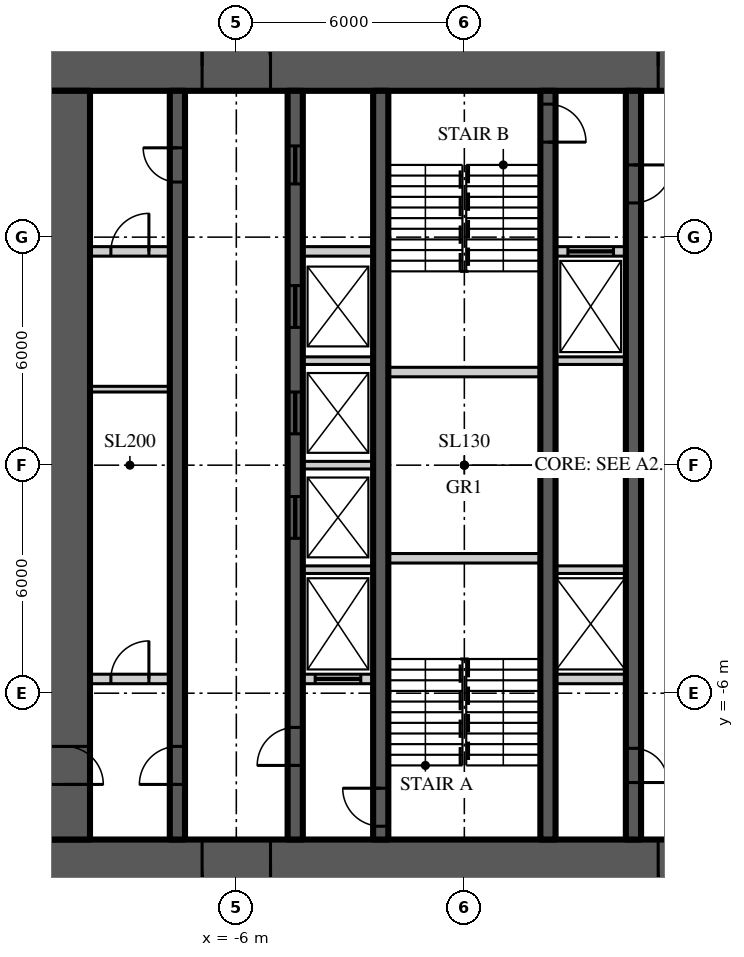
"""IFC4 building model, lengths in metres.
Left out: names, types, materials, properties, quantities, classifications, styles, units other than length and angle.
Written with IfcOpenShell. Run it as: python <this file> out.ifc"""

import sys

from ifc_helpers import new_model, si_unit, direction, frame, frame_2d, origin, place, context, subcontext, project, spatial, rectangle, extrude, element, fill, save


model = new_model("IFC4")
c1 = context("Model", 3, precision=1e-05, world=origin(), true_north=direction((0.0, 1.0)))
c2 = subcontext(c1, "Body", "Model", "MODEL_VIEW")
j1 = project(units=[si_unit("LENGTHUNIT", "METRE"), si_unit("PLANEANGLEUNIT", "RADIAN")], contexts=[c1])
p1 = place(None, origin())
s1 = spatial("IfcSite", under=j1, at=p1, CompositionType="ELEMENT")
p2 = place(p1, origin())
s2 = spatial("IfcBuilding", under=s1, at=p2, CompositionType="ELEMENT")
p3 = place(p2, frame((0.0, 0.0, 163.2)))
s3 = spatial("IfcBuildingStorey", under=s2, at=p3, CompositionType="ELEMENT", Elevation=163.2)
p4 = place(p3, frame((-11.15, 10.5, 0.0), z_axis=(0.0, 0.0, 1.0), x_axis=(1.0, 0.0, 0.0)))
e1 = element("IfcWall", 1, at=p4, inside=s3, PredefinedType="SHEAR", context=c2, shape_type="SweptSolid", body=[
    extrude(rectangle(XDim=22.3, YDim=1.3, at=frame_2d((11.15, 0.0))), origin(), (0.0, 0.0, 1.0), 3.9),
])
p5 = place(p4, frame((4.25, 0.0, 0.0)))
e2 = element("IfcOpeningElement", 2, at=p5, cuts=e1, PredefinedType="OPENING", context=c2, shape_type="SweptSolid", body=[
    extrude(rectangle(XDim=1.8, YDim=2.2, at=frame_2d((0.9, 1.1))), frame((0.0, 0.66, 0.0), z_axis=(0.0, -1.0, 0.0), x_axis=(1.0, 0.0, 0.0)), (0.0, 0.0, 1.0), 1.32),
])
p6 = place(p4, frame((16.25, 0.0, 0.0)))
e3 = element("IfcOpeningElement", 3, at=p6, cuts=e1, PredefinedType="OPENING", context=c2, shape_type="SweptSolid", body=[
    extrude(rectangle(XDim=1.8, YDim=2.2, at=frame_2d((0.9, 1.1))), frame((0.0, 0.66, 0.0), z_axis=(0.0, -1.0, 0.0), x_axis=(1.0, 0.0, 0.0)), (0.0, 0.0, 1.0), 1.32),
])
p7 = place(p3, frame((11.15, -10.5, 0.0), z_axis=(0.0, 0.0, 1.0), x_axis=(-1.0, 0.0, 0.0)))
e4 = element("IfcWall", 4, at=p7, inside=s3, PredefinedType="SHEAR", context=c2, shape_type="SweptSolid", body=[
    extrude(rectangle(XDim=22.3, YDim=1.3, at=frame_2d((11.15, 0.0))), origin(), (0.0, 0.0, 1.0), 3.9),
])
p8 = place(p7, frame((16.25, 0.0, 0.0)))
e5 = element("IfcOpeningElement", 5, at=p8, cuts=e4, PredefinedType="OPENING", context=c2, shape_type="SweptSolid", body=[
    extrude(rectangle(XDim=1.8, YDim=2.2, at=frame_2d((0.9, 1.1))), frame((0.0, 0.66, 0.0), z_axis=(0.0, -1.0, 0.0), x_axis=(1.0, 0.0, 0.0)), (0.0, 0.0, 1.0), 1.32),
])
p9 = place(p7, frame((4.25, 0.0, 0.0)))
e6 = element("IfcOpeningElement", 6, at=p9, cuts=e4, PredefinedType="OPENING", context=c2, shape_type="SweptSolid", body=[
    extrude(rectangle(XDim=1.8, YDim=2.2, at=frame_2d((0.9, 1.1))), frame((0.0, 0.66, 0.0), z_axis=(0.0, -1.0, 0.0), x_axis=(1.0, 0.0, 0.0)), (0.0, 0.0, 1.0), 1.32),
])
p10 = place(p3, frame((-10.5, 9.85, 0.0), z_axis=(0.0, 0.0, 1.0), x_axis=(0.0, -1.0, 0.0)))
e7 = element("IfcWall", 7, at=p10, inside=s3, PredefinedType="SHEAR", context=c2, shape_type="SweptSolid", body=[
    extrude(rectangle(XDim=19.7, YDim=1.3, at=frame_2d((9.85, 0.0))), origin(), (0.0, 0.0, 1.0), 3.9),
])
p11 = place(p10, frame((17.25, 0.0, 0.0)))
e8 = element("IfcOpeningElement", 8, at=p11, cuts=e7, PredefinedType="OPENING", context=c2, shape_type="SweptSolid", body=[
    extrude(rectangle(XDim=1.0, YDim=2.2, at=frame_2d((0.5, 1.1))), frame((0.0, 0.66, 0.0), z_axis=(0.0, -1.0, 0.0), x_axis=(1.0, 0.0, 0.0)), (0.0, 0.0, 1.0), 1.32),
])
p12 = place(p3, frame((-7.55, -9.85, 0.0), z_axis=(0.0, 0.0, 1.0), x_axis=(0.0, 1.0, 0.0)))
e9 = element("IfcWall", 9, at=p12, inside=s3, PredefinedType="SHEAR", context=c2, shape_type="SweptSolid", body=[
    extrude(rectangle(XDim=19.7, YDim=0.4, at=frame_2d((9.85, 0.0))), origin(), (0.0, 0.0, 1.0), 3.9),
])
p13 = place(p12, frame((1.45, 0.0, 0.0)))
e10 = element("IfcOpeningElement", 10, at=p13, cuts=e9, PredefinedType="OPENING", context=c2, shape_type="SweptSolid", body=[
    extrude(rectangle(XDim=1.0, YDim=2.2, at=frame_2d((0.5, 1.1))), frame((0.0, 0.21, 0.0), z_axis=(0.0, -1.0, 0.0), x_axis=(1.0, 0.0, 0.0)), (0.0, 0.0, 1.0), 0.42),
])
p14 = place(p12, frame((17.3, 0.0, 0.0)))
e11 = element("IfcOpeningElement", 11, at=p14, cuts=e9, PredefinedType="OPENING", context=c2, shape_type="SweptSolid", body=[
    extrude(rectangle(XDim=0.9, YDim=2.1, at=frame_2d((0.45, 1.05))), frame((0.0, 0.21, 0.0), z_axis=(0.0, -1.0, 0.0), x_axis=(1.0, 0.0, 0.0)), (0.0, 0.0, 1.0), 0.42),
])
p15 = place(p3, frame((-4.45, -9.85, 0.0), z_axis=(0.0, 0.0, 1.0), x_axis=(0.0, 1.0, 0.0)))
e12 = element("IfcWall", 12, at=p15, inside=s3, PredefinedType="SHEAR", context=c2, shape_type="SweptSolid", body=[
    extrude(rectangle(XDim=19.7, YDim=0.4, at=frame_2d((9.85, 0.0))), origin(), (0.0, 0.0, 1.0), 3.9),
])
p16 = place(p15, frame((1.95, 0.0, 0.0)))
e13 = element("IfcOpeningElement", 13, at=p16, cuts=e12, PredefinedType="OPENING", context=c2, shape_type="SweptSolid", body=[
    extrude(rectangle(XDim=1.0, YDim=2.2, at=frame_2d((0.5, 1.1))), frame((0.0, 0.21, 0.0), z_axis=(0.0, -1.0, 0.0), x_axis=(1.0, 0.0, 0.0)), (0.0, 0.0, 1.0), 0.42),
])
p17 = place(p15, frame((17.25, 0.0, 0.0)))
e14 = element("IfcOpeningElement", 14, at=p17, cuts=e12, PredefinedType="OPENING", context=c2, shape_type="SweptSolid", body=[
    extrude(rectangle(XDim=1.0, YDim=2.1, at=frame_2d((0.5, 1.05))), frame((0.0, 0.21, 0.0), z_axis=(0.0, -1.0, 0.0), x_axis=(1.0, 0.0, 0.0)), (0.0, 0.0, 1.0), 0.42),
])
p18 = place(p15, frame((7.925, 0.0, 0.0)))
e15 = element("IfcOpeningElement", 15, at=p18, cuts=e12, PredefinedType="OPENING", context=c2, shape_type="SweptSolid", body=[
    extrude(rectangle(XDim=1.1, YDim=2.2, at=frame_2d((0.55, 1.1))), frame((0.0, 0.21, 0.0), z_axis=(0.0, -1.0, 0.0), x_axis=(1.0, 0.0, 0.0)), (0.0, 0.0, 1.0), 0.42),
])
p19 = place(p15, frame((10.675, 0.0, 0.0)))
e16 = element("IfcOpeningElement", 16, at=p19, cuts=e12, PredefinedType="OPENING", context=c2, shape_type="SweptSolid", body=[
    extrude(rectangle(XDim=1.1, YDim=2.2, at=frame_2d((0.55, 1.1))), frame((0.0, 0.21, 0.0), z_axis=(0.0, -1.0, 0.0), x_axis=(1.0, 0.0, 0.0)), (0.0, 0.0, 1.0), 0.42),
])
p20 = place(p15, frame((13.475, 0.0, 0.0)))
e17 = element("IfcOpeningElement", 17, at=p20, cuts=e12, PredefinedType="OPENING", context=c2, shape_type="SweptSolid", body=[
    extrude(rectangle(XDim=1.1, YDim=2.2, at=frame_2d((0.55, 1.1))), frame((0.0, 0.21, 0.0), z_axis=(0.0, -1.0, 0.0), x_axis=(1.0, 0.0, 0.0)), (0.0, 0.0, 1.0), 0.42),
])
p21 = place(p3, frame((4.45, 9.85, 0.0), z_axis=(0.0, 0.0, 1.0), x_axis=(0.0, -1.0, 0.0)))
e18 = element("IfcWall", 18, at=p21, inside=s3, PredefinedType="SHEAR", context=c2, shape_type="SweptSolid", body=[
    extrude(rectangle(XDim=19.7, YDim=0.4, at=frame_2d((9.85, 0.0))), origin(), (0.0, 0.0, 1.0), 3.9),
])
p22 = place(p21, frame((1.95, 0.0, 0.0)))
e19 = element("IfcOpeningElement", 19, at=p22, cuts=e18, PredefinedType="OPENING", context=c2, shape_type="SweptSolid", body=[
    extrude(rectangle(XDim=1.0, YDim=2.2, at=frame_2d((0.5, 1.1))), frame((0.0, 0.21, 0.0), z_axis=(0.0, -1.0, 0.0), x_axis=(1.0, 0.0, 0.0)), (0.0, 0.0, 1.0), 0.42),
])
p23 = place(p21, frame((17.3, 0.0, 0.0)))
e20 = element("IfcOpeningElement", 20, at=p23, cuts=e18, PredefinedType="OPENING", context=c2, shape_type="SweptSolid", body=[
    extrude(rectangle(XDim=0.9, YDim=2.1, at=frame_2d((0.45, 1.05))), frame((0.0, 0.21, 0.0), z_axis=(0.0, -1.0, 0.0), x_axis=(1.0, 0.0, 0.0)), (0.0, 0.0, 1.0), 0.42),
])
p24 = place(p3, frame((-2.2, -9.85, 0.0), z_axis=(0.0, 0.0, 1.0), x_axis=(0.0, 1.0, 0.0)))
e21 = element("IfcWall", 21, at=p24, inside=s3, PredefinedType="SHEAR", context=c2, shape_type="SweptSolid", body=[
    extrude(rectangle(XDim=19.7, YDim=0.4, at=frame_2d((9.85, 0.0))), origin(), (0.0, 0.0, 1.0), 3.9),
])
p25 = place(p24, frame((0.35, 0.0, 0.0)))
e22 = element("IfcOpeningElement", 22, at=p25, cuts=e21, PredefinedType="OPENING", context=c2, shape_type="SweptSolid", body=[
    extrude(rectangle(XDim=1.0, YDim=2.2, at=frame_2d((0.5, 1.1))), frame((0.0, 0.21, 0.0), z_axis=(0.0, -1.0, 0.0), x_axis=(1.0, 0.0, 0.0)), (0.0, 0.0, 1.0), 0.42),
])
p26 = place(p3, frame((2.2, 9.85, 0.0), z_axis=(0.0, 0.0, 1.0), x_axis=(0.0, -1.0, 0.0)))
e23 = element("IfcWall", 23, at=p26, inside=s3, PredefinedType="SHEAR", context=c2, shape_type="SweptSolid", body=[
    extrude(rectangle(XDim=19.7, YDim=0.4, at=frame_2d((9.85, 0.0))), origin(), (0.0, 0.0, 1.0), 3.9),
])
p27 = place(p26, frame((0.35, 0.0, 0.0)))
e24 = element("IfcOpeningElement", 24, at=p27, cuts=e23, PredefinedType="OPENING", context=c2, shape_type="SweptSolid", body=[
    extrude(rectangle(XDim=1.0, YDim=2.2, at=frame_2d((0.5, 1.1))), frame((0.0, 0.21, 0.0), z_axis=(0.0, -1.0, 0.0), x_axis=(1.0, 0.0, 0.0)), (0.0, 0.0, 1.0), 0.42),
])
p28 = place(p3, frame((-9.85, 5.625, 0.0), z_axis=(0.0, 0.0, 1.0), x_axis=(1.0, 0.0, 0.0)))
e25 = element("IfcWall", 25, at=p28, inside=s3, PredefinedType="SOLIDWALL", context=c2, shape_type="SweptSolid", body=[
    extrude(rectangle(XDim=2.1, YDim=0.25, at=frame_2d((1.05, 0.0))), origin(), (0.0, 0.0, 1.0), 3.7),
])
p29 = place(p28, frame((0.55, 0.0, 0.0)))
e26 = element("IfcOpeningElement", 26, at=p29, cuts=e25, PredefinedType="OPENING", context=c2, shape_type="SweptSolid", body=[
    extrude(rectangle(XDim=1.0, YDim=2.2, at=frame_2d((0.5, 1.1))), frame((0.0, 0.135, 0.0), z_axis=(0.0, -1.0, 0.0), x_axis=(1.0, 0.0, 0.0)), (0.0, 0.0, 1.0), 0.27),
])
p30 = place(p3, frame((-4.25, 5.625, 0.0), z_axis=(0.0, 0.0, 1.0), x_axis=(1.0, 0.0, 0.0)))
e27 = element("IfcWall", 27, at=p30, inside=s3, PredefinedType="SOLIDWALL", context=c2, shape_type="SweptSolid", body=[
    extrude(rectangle(XDim=1.85, YDim=0.25, at=frame_2d((0.925, 0.0))), origin(), (0.0, 0.0, 1.0), 3.7),
])
p31 = place(p3, frame((2.4, 5.625, 0.0), z_axis=(0.0, 0.0, 1.0), x_axis=(1.0, 0.0, 0.0)))
e28 = element("IfcWall", 28, at=p31, inside=s3, PredefinedType="SOLIDWALL", context=c2, shape_type="SweptSolid", body=[
    extrude(rectangle(XDim=1.85, YDim=0.25, at=frame_2d((0.925, 0.0))), origin(), (0.0, 0.0, 1.0), 3.7),
])
p32 = place(p31, frame((0.325, 0.0, 0.0)))
e29 = element("IfcOpeningElement", 29, at=p32, cuts=e28, PredefinedType="OPENING", context=c2, shape_type="SweptSolid", body=[
    extrude(rectangle(XDim=1.2, YDim=2.2, at=frame_2d((0.6, 1.1))), frame((0.0, 0.135, 0.0), z_axis=(0.0, -1.0, 0.0), x_axis=(1.0, 0.0, 0.0)), (0.0, 0.0, 1.0), 0.27),
])
p33 = place(p3, frame((-9.85, -5.625, 0.0), z_axis=(0.0, 0.0, 1.0), x_axis=(1.0, 0.0, 0.0)))
e30 = element("IfcWall", 30, at=p33, inside=s3, PredefinedType="SOLIDWALL", context=c2, shape_type="SweptSolid", body=[
    extrude(rectangle(XDim=2.1, YDim=0.25, at=frame_2d((1.05, 0.0))), origin(), (0.0, 0.0, 1.0), 3.7),
])
p34 = place(p33, frame((0.55, 0.0, 0.0)))
e31 = element("IfcOpeningElement", 31, at=p34, cuts=e30, PredefinedType="OPENING", context=c2, shape_type="SweptSolid", body=[
    extrude(rectangle(XDim=1.0, YDim=2.2, at=frame_2d((0.5, 1.1))), frame((0.0, 0.135, 0.0), z_axis=(0.0, -1.0, 0.0), x_axis=(1.0, 0.0, 0.0)), (0.0, 0.0, 1.0), 0.27),
])
p35 = place(p3, frame((-4.25, -5.625, 0.0), z_axis=(0.0, 0.0, 1.0), x_axis=(1.0, 0.0, 0.0)))
e32 = element("IfcWall", 32, at=p35, inside=s3, PredefinedType="SOLIDWALL", context=c2, shape_type="SweptSolid", body=[
    extrude(rectangle(XDim=1.85, YDim=0.25, at=frame_2d((0.925, 0.0))), origin(), (0.0, 0.0, 1.0), 3.7),
])
p36 = place(p35, frame((0.325, 0.0, 0.0)))
e33 = element("IfcOpeningElement", 33, at=p36, cuts=e32, PredefinedType="OPENING", context=c2, shape_type="SweptSolid", body=[
    extrude(rectangle(XDim=1.2, YDim=2.2, at=frame_2d((0.6, 1.1))), frame((0.0, 0.135, 0.0), z_axis=(0.0, -1.0, 0.0), x_axis=(1.0, 0.0, 0.0)), (0.0, 0.0, 1.0), 0.27),
])
p37 = place(p3, frame((2.4, -5.625, 0.0), z_axis=(0.0, 0.0, 1.0), x_axis=(1.0, 0.0, 0.0)))
e34 = element("IfcWall", 34, at=p37, inside=s3, PredefinedType="SOLIDWALL", context=c2, shape_type="SweptSolid", body=[
    extrude(rectangle(XDim=1.85, YDim=0.25, at=frame_2d((0.925, 0.0))), origin(), (0.0, 0.0, 1.0), 3.7),
])
for number, where, z_axis, x_axis in (
    (35, (-2.0, -2.45, 0.0), (0.0, 0.0, 1.0), (1.0, 0.0, 0.0)),
    (36, (-2.0, 2.45, 0.0), (0.0, 0.0, 1.0), (1.0, 0.0, 0.0)),
):
    element("IfcWall", number, at=place(p3, frame(where, z_axis=z_axis, x_axis=x_axis)), inside=s3, PredefinedType="SOLIDWALL", context=c2, shape_type="SweptSolid", body=[
        extrude(rectangle(XDim=4.0, YDim=0.25, at=frame_2d((2.0, 0.0))), origin(), (0.0, 0.0, 1.0), 3.7),
    ])
for number, where, z_axis, x_axis in (
    (37, (-4.25, -2.75, 0.0), (0.0, 0.0, 1.0), (1.0, 0.0, 0.0)),
    (38, (2.4, -2.75, 0.0), (0.0, 0.0, 1.0), (1.0, 0.0, 0.0)),
    (39, (-4.25, 0.0, 0.0), (0.0, 0.0, 1.0), (1.0, 0.0, 0.0)),
    (40, (-4.25, 2.75, 0.0), (0.0, 0.0, 1.0), (1.0, 0.0, 0.0)),
    (41, (2.4, 2.75, 0.0), (0.0, 0.0, 1.0), (1.0, 0.0, 0.0)),
):
    element("IfcWall", number, at=place(p3, frame(where, z_axis=z_axis, x_axis=x_axis)), inside=s3, PredefinedType="SOLIDWALL", context=c2, shape_type="SweptSolid", body=[
        extrude(rectangle(XDim=1.85, YDim=0.2, at=frame_2d((0.925, 0.0))), origin(), (0.0, 0.0, 1.0), 3.7),
    ])
p38 = place(p3, frame((-9.85, 2.0, 0.0), z_axis=(0.0, 0.0, 1.0), x_axis=(1.0, 0.0, 0.0)))
e42 = element("IfcWall", 42, at=p38, inside=s3, PredefinedType="SOLIDWALL", context=c2, shape_type="SweptSolid", body=[
    extrude(rectangle(XDim=2.1, YDim=0.15, at=frame_2d((1.05, 0.0))), origin(), (0.0, 0.0, 1.0), 3.77),
])
p39 = place(p5, origin())
e43 = element("IfcDoor", 43, at=p39, inside=s3, OperationType="DOUBLE_DOOR_DOUBLE_SWING", PredefinedType="DOOR", context=c2, shape_type="SweptSolid", body=[
    extrude(rectangle(XDim=1.8, YDim=2.2, at=frame_2d((0.9, 1.1))), frame((0.0, 0.025, 0.0), z_axis=(0.0, -1.0, 0.0), x_axis=(1.0, 0.0, 0.0)), (0.0, 0.0, 1.0), 0.05),
])
fill(e2, e43)
p40 = place(p8, origin())
e44 = element("IfcDoor", 44, at=p40, inside=s3, OperationType="DOUBLE_DOOR_DOUBLE_SWING", PredefinedType="DOOR", context=c2, shape_type="SweptSolid", body=[
    extrude(rectangle(XDim=1.8, YDim=2.2, at=frame_2d((0.9, 1.1))), frame((0.0, 0.025, 0.0), z_axis=(0.0, -1.0, 0.0), x_axis=(1.0, 0.0, 0.0)), (0.0, 0.0, 1.0), 0.05),
])
fill(e5, e44)
p41 = place(p6, origin())
e45 = element("IfcDoor", 45, at=p41, inside=s3, OperationType="DOUBLE_DOOR_DOUBLE_SWING", PredefinedType="DOOR", context=c2, shape_type="SweptSolid", body=[
    extrude(rectangle(XDim=1.8, YDim=2.2, at=frame_2d((0.9, 1.1))), frame((0.0, 0.025, 0.0), z_axis=(0.0, -1.0, 0.0), x_axis=(1.0, 0.0, 0.0)), (0.0, 0.0, 1.0), 0.05),
])
fill(e3, e45)
p42 = place(p9, origin())
e46 = element("IfcDoor", 46, at=p42, inside=s3, OperationType="DOUBLE_DOOR_DOUBLE_SWING", PredefinedType="DOOR", context=c2, shape_type="SweptSolid", body=[
    extrude(rectangle(XDim=1.8, YDim=2.2, at=frame_2d((0.9, 1.1))), frame((0.0, 0.025, 0.0), z_axis=(0.0, -1.0, 0.0), x_axis=(1.0, 0.0, 0.0)), (0.0, 0.0, 1.0), 0.05),
])
fill(e6, e46)
p43 = place(p13, origin())
e47 = element("IfcDoor", 47, at=p43, inside=s3, OperationType="SINGLE_SWING_LEFT", PredefinedType="DOOR", context=c2, shape_type="SweptSolid", body=[
    extrude(rectangle(XDim=1.0, YDim=2.2, at=frame_2d((0.5, 1.1))), frame((0.0, 0.025, 0.0), z_axis=(0.0, -1.0, 0.0), x_axis=(1.0, 0.0, 0.0)), (0.0, 0.0, 1.0), 0.05),
])
fill(e10, e47)
p44 = place(p11, origin())
e48 = element("IfcDoor", 48, at=p44, inside=s3, OperationType="SINGLE_SWING_RIGHT", PredefinedType="DOOR", context=c2, shape_type="SweptSolid", body=[
    extrude(rectangle(XDim=1.0, YDim=2.2, at=frame_2d((0.5, 1.1))), frame((0.0, 0.025, 0.0), z_axis=(0.0, -1.0, 0.0), x_axis=(1.0, 0.0, 0.0)), (0.0, 0.0, 1.0), 0.05),
])
fill(e8, e48)
p45 = place(p16, origin())
e49 = element("IfcDoor", 49, at=p45, inside=s3, OperationType="SINGLE_SWING_LEFT", PredefinedType="DOOR", context=c2, shape_type="SweptSolid", body=[
    extrude(rectangle(XDim=1.0, YDim=2.2, at=frame_2d((0.5, 1.1))), frame((0.0, 0.025, 0.0), z_axis=(0.0, -1.0, 0.0), x_axis=(1.0, 0.0, 0.0)), (0.0, 0.0, 1.0), 0.05),
])
fill(e13, e49)
p46 = place(p25, origin())
e50 = element("IfcDoor", 50, at=p46, inside=s3, OperationType="SINGLE_SWING_RIGHT", PredefinedType="DOOR", context=c2, shape_type="SweptSolid", body=[
    extrude(rectangle(XDim=1.0, YDim=2.2, at=frame_2d((0.5, 1.1))), frame((0.0, 0.025, 0.0), z_axis=(0.0, -1.0, 0.0), x_axis=(1.0, 0.0, 0.0)), (0.0, 0.0, 1.0), 0.05),
])
fill(e22, e50)
p47 = place(p22, origin())
e51 = element("IfcDoor", 51, at=p47, inside=s3, OperationType="SINGLE_SWING_LEFT", PredefinedType="DOOR", context=c2, shape_type="SweptSolid", body=[
    extrude(rectangle(XDim=1.0, YDim=2.2, at=frame_2d((0.5, 1.1))), frame((0.0, 0.025, 0.0), z_axis=(0.0, -1.0, 0.0), x_axis=(1.0, 0.0, 0.0)), (0.0, 0.0, 1.0), 0.05),
])
fill(e19, e51)
p48 = place(p27, origin())
e52 = element("IfcDoor", 52, at=p48, inside=s3, OperationType="SINGLE_SWING_RIGHT", PredefinedType="DOOR", context=c2, shape_type="SweptSolid", body=[
    extrude(rectangle(XDim=1.0, YDim=2.2, at=frame_2d((0.5, 1.1))), frame((0.0, 0.025, 0.0), z_axis=(0.0, -1.0, 0.0), x_axis=(1.0, 0.0, 0.0)), (0.0, 0.0, 1.0), 0.05),
])
fill(e24, e52)
p49 = place(p14, origin())
e53 = element("IfcDoor", 53, at=p49, inside=s3, OperationType="SINGLE_SWING_RIGHT", PredefinedType="DOOR", context=c2, shape_type="SweptSolid", body=[
    extrude(rectangle(XDim=0.9, YDim=2.1, at=frame_2d((0.45, 1.05))), frame((0.0, 0.025, 0.0), z_axis=(0.0, -1.0, 0.0), x_axis=(1.0, 0.0, 0.0)), (0.0, 0.0, 1.0), 0.05),
])
fill(e11, e53)
p50 = place(p17, origin())
e54 = element("IfcDoor", 54, at=p50, inside=s3, OperationType="SLIDING_TO_LEFT", PredefinedType="DOOR", context=c2, shape_type="SweptSolid", body=[
    extrude(rectangle(XDim=1.0, YDim=2.1, at=frame_2d((0.5, 1.05))), frame((0.0, 0.025, 0.0), z_axis=(0.0, -1.0, 0.0), x_axis=(1.0, 0.0, 0.0)), (0.0, 0.0, 1.0), 0.05),
])
fill(e14, e54)
p51 = place(p23, origin())
e55 = element("IfcDoor", 55, at=p51, inside=s3, OperationType="SINGLE_SWING_RIGHT", PredefinedType="DOOR", context=c2, shape_type="SweptSolid", body=[
    extrude(rectangle(XDim=0.9, YDim=2.1, at=frame_2d((0.45, 1.05))), frame((0.0, 0.025, 0.0), z_axis=(0.0, -1.0, 0.0), x_axis=(1.0, 0.0, 0.0)), (0.0, 0.0, 1.0), 0.05),
])
fill(e20, e55)
p52 = place(p18, origin())
e56 = element("IfcDoor", 56, at=p52, inside=s3, OperationType="SLIDING_TO_LEFT", PredefinedType="DOOR", context=c2, shape_type="SweptSolid", body=[
    extrude(rectangle(XDim=1.1, YDim=2.2, at=frame_2d((0.55, 1.1))), frame((0.0, 0.025, 0.0), z_axis=(0.0, -1.0, 0.0), x_axis=(1.0, 0.0, 0.0)), (0.0, 0.0, 1.0), 0.05),
])
fill(e15, e56)
p53 = place(p19, origin())
e57 = element("IfcDoor", 57, at=p53, inside=s3, OperationType="SLIDING_TO_LEFT", PredefinedType="DOOR", context=c2, shape_type="SweptSolid", body=[
    extrude(rectangle(XDim=1.1, YDim=2.2, at=frame_2d((0.55, 1.1))), frame((0.0, 0.025, 0.0), z_axis=(0.0, -1.0, 0.0), x_axis=(1.0, 0.0, 0.0)), (0.0, 0.0, 1.0), 0.05),
])
fill(e16, e57)
p54 = place(p20, origin())
e58 = element("IfcDoor", 58, at=p54, inside=s3, OperationType="SLIDING_TO_LEFT", PredefinedType="DOOR", context=c2, shape_type="SweptSolid", body=[
    extrude(rectangle(XDim=1.1, YDim=2.2, at=frame_2d((0.55, 1.1))), frame((0.0, 0.025, 0.0), z_axis=(0.0, -1.0, 0.0), x_axis=(1.0, 0.0, 0.0)), (0.0, 0.0, 1.0), 0.05),
])
fill(e17, e58)
p55 = place(p36, origin())
e59 = element("IfcDoor", 59, at=p55, inside=s3, OperationType="SLIDING_TO_LEFT", PredefinedType="DOOR", context=c2, shape_type="SweptSolid", body=[
    extrude(rectangle(XDim=1.2, YDim=2.2, at=frame_2d((0.6, 1.1))), frame((0.0, 0.025, 0.0), z_axis=(0.0, -1.0, 0.0), x_axis=(1.0, 0.0, 0.0)), (0.0, 0.0, 1.0), 0.05),
])
fill(e33, e59)
p56 = place(p32, origin())
e60 = element("IfcDoor", 60, at=p56, inside=s3, OperationType="SLIDING_TO_LEFT", PredefinedType="DOOR", context=c2, shape_type="SweptSolid", body=[
    extrude(rectangle(XDim=1.2, YDim=2.2, at=frame_2d((0.6, 1.1))), frame((0.0, 0.025, 0.0), z_axis=(0.0, -1.0, 0.0), x_axis=(1.0, 0.0, 0.0)), (0.0, 0.0, 1.0), 0.05),
])
fill(e29, e60)
p57 = place(p29, origin())
e61 = element("IfcDoor", 61, at=p57, inside=s3, OperationType="SINGLE_SWING_RIGHT", PredefinedType="DOOR", context=c2, shape_type="SweptSolid", body=[
    extrude(rectangle(XDim=1.0, YDim=2.2, at=frame_2d((0.5, 1.1))), frame((0.0, 0.025, 0.0), z_axis=(0.0, -1.0, 0.0), x_axis=(1.0, 0.0, 0.0)), (0.0, 0.0, 1.0), 0.05),
])
fill(e26, e61)
p58 = place(p34, origin())
e62 = element("IfcDoor", 62, at=p58, inside=s3, OperationType="SINGLE_SWING_RIGHT", PredefinedType="DOOR", context=c2, shape_type="SweptSolid", body=[
    extrude(rectangle(XDim=1.0, YDim=2.2, at=frame_2d((0.5, 1.1))), frame((0.0, 0.025, 0.0), z_axis=(0.0, -1.0, 0.0), x_axis=(1.0, 0.0, 0.0)), (0.0, 0.0, 1.0), 0.05),
])
fill(e31, e62)
save(model, sys.argv[1])
